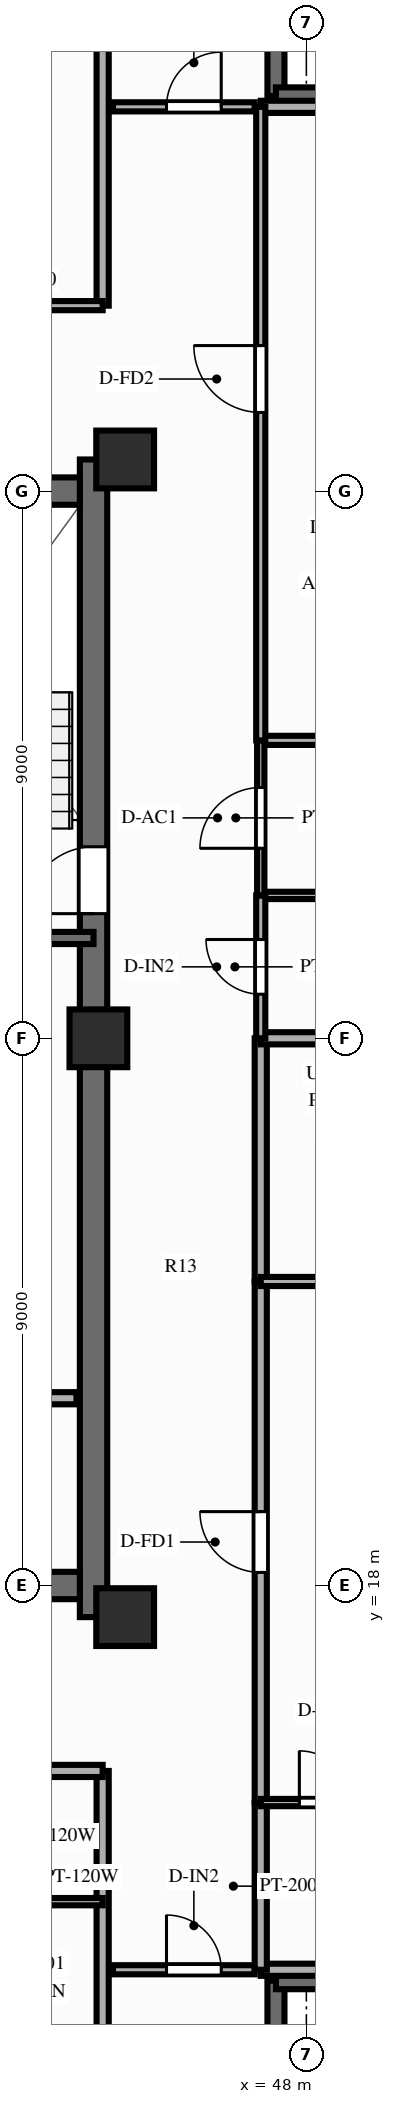
"""IFC4 building model, lengths in metres.
Left out: names, types, materials, properties, quantities, classifications, styles, units other than length and angle.
Written with IfcOpenShell. Run it as: python <this file> out.ifc"""

import sys

from ifc_helpers import new_model, si_unit, direction, frame, frame_2d, origin, origin_2d, place, context, subcontext, project, spatial, rectangle, extrude, source, transform, mapped, element, fill, save


model = new_model("IFC4")
c1 = context("Model", 3, precision=1e-05, world=origin(), true_north=direction((0.0, 1.0)))
c2 = subcontext(c1, "Body", "Model", "MODEL_VIEW")
j1 = project(units=[si_unit("LENGTHUNIT", "METRE"), si_unit("PLANEANGLEUNIT", "RADIAN")], contexts=[c1])
p1 = place(None, origin())
s1 = spatial("IfcSite", under=j1, at=p1, CompositionType="ELEMENT")
p2 = place(p1, origin())
s2 = spatial("IfcBuilding", under=s1, at=p2, CompositionType="ELEMENT")
p3 = place(p2, frame((0.0, 0.0, 243.0)))
s3 = spatial("IfcBuildingStorey", under=s2, at=p3, CompositionType="ELEMENT", Elevation=243.0)
p4 = place(p3, frame((44.5, 17.48, 0.0), z_axis=(0.0, 0.0, 1.0), x_axis=(0.0, 1.0, 0.0)))
e1 = element("IfcWall", 1, at=p4, inside=s3, PredefinedType="SHEAR", context=c2, shape_type="SweptSolid", body=[
    extrude(rectangle(XDim=19.04, YDim=0.45, at=frame_2d((9.52, 0.0))), origin(), (0.0, 0.0, 1.0), 3.0),
])
p5 = place(p4, frame((12.67, 0.0, 0.0), z_axis=(0.0, 0.0, 1.0), x_axis=(-1.0, 0.0, 0.0)))
e2 = element("IfcOpeningElement", 2, at=p5, cuts=e1, PredefinedType="OPENING", context=c2, shape_type="SweptSolid", body=[
    extrude(rectangle(XDim=1.1, YDim=2.15, at=frame_2d((0.55, 1.075))), frame((0.0, 0.237, 0.0), z_axis=(0.0, -1.0, 0.0), x_axis=(1.0, 0.0, 0.0)), (0.0, 0.0, 1.0), 0.474),
])
p6 = place(p3, frame((31.725, 18.0, 0.0), z_axis=(0.0, 0.0, 1.0), x_axis=(1.0, 0.0, 0.0)))
e3 = element("IfcWall", 3, at=p6, inside=s3, PredefinedType="SHEAR", context=c2, shape_type="SweptSolid", body=[
    extrude(rectangle(XDim=12.55, YDim=0.45, at=frame_2d((6.275, 0.0))), origin(), (0.0, 0.0, 1.0), 3.0),
])
p7 = place(p3, frame((31.725, 36.0, 0.0), z_axis=(0.0, 0.0, 1.0), x_axis=(1.0, 0.0, 0.0)))
e4 = element("IfcWall", 4, at=p7, inside=s3, PredefinedType="SHEAR", context=c2, shape_type="SweptSolid", body=[
    extrude(rectangle(XDim=12.55, YDim=0.45, at=frame_2d((6.275, 0.0))), origin(), (0.0, 0.0, 1.0), 3.0),
])
p8 = place(p7, frame((5.225, 0.0, 0.0), z_axis=(0.0, 0.0, 1.0), x_axis=(-1.0, 0.0, 0.0)))
e5 = element("IfcOpeningElement", 5, at=p8, cuts=e4, PredefinedType="OPENING", context=c2, shape_type="SweptSolid", body=[
    extrude(rectangle(XDim=1.4, YDim=2.15, at=frame_2d((0.7, 1.075))), frame((0.0, 0.237, 0.0), z_axis=(0.0, -1.0, 0.0), x_axis=(1.0, 0.0, 0.0)), (0.0, 0.0, 1.0), 0.474),
])
m1 = source(origin(), c2, "Body", "SweptSolid", [
    extrude(rectangle(XDim=0.95, YDim=0.95, at=origin_2d()), origin(), (0.0, 0.0, 1.0), 3.0),
])
for number, where, z_axis, x_axis in (
    (6, (45.02, 17.48, 0.0), (0.0, 0.0, 1.0), (1.0, 0.0, 0.0)),
    (7, (45.02, 36.52, 0.0), (0.0, 0.0, 1.0), (1.0, 0.0, 0.0)),
    (8, (44.58, 27.0, 0.0), (0.0, 0.0, 1.0), (1.0, 0.0, 0.0)),
):
    element("IfcColumn", number, at=place(p3, frame(where, z_axis=z_axis, x_axis=x_axis)), inside=s3, PredefinedType="COLUMN", context=c2, shape_type="MappedRepresentation", body=[
        mapped(m1, transform((0.0, 0.0, 0.0), scale=1.0)),
    ])
for number, where, z_axis, x_axis in (
    (9, (47.5, 6.08, 0.0), (0.0, 0.0, 1.0), (0.0, 1.0, 0.0)),
    (10, (47.5, 11.5, 0.0), (0.0, 0.0, 1.0), (1.0, 0.0, 0.0)),
    (11, (47.5, 42.5, 0.0), (0.0, 0.0, 1.0), (0.0, 1.0, 0.0)),
    (12, (47.5, 42.5, 0.0), (0.0, 0.0, 1.0), (1.0, 0.0, 0.0)),
):
    element("IfcWall", number, at=place(p3, frame(where, z_axis=z_axis, x_axis=x_axis)), inside=s3, PredefinedType="SOLIDWALL", context=c2, shape_type="SweptSolid", body=[
        extrude(rectangle(XDim=5.42, YDim=0.28, at=frame_2d((2.71, 0.0))), origin(), (0.0, 0.0, 1.0), 2.28),
    ])
p9 = place(p3, frame((42.88, 21.08, 0.0), z_axis=(0.0, 0.0, 1.0), x_axis=(1.0, 0.0, 0.0)))
e13 = element("IfcWall", 13, at=p9, inside=s3, PredefinedType="PARTITIONING", context=c2, shape_type="SweptSolid", body=[
    extrude(rectangle(XDim=1.34, YDim=0.2, at=frame_2d((0.67, 0.0))), origin(), (0.0, 0.0, 1.0), 2.79),
])
p10 = place(p3, frame((40.57, 28.65, 0.0), z_axis=(0.0, 0.0, 1.0), x_axis=(1.0, 0.0, 0.0)))
e14 = element("IfcWall", 14, at=p10, inside=s3, PredefinedType="SOLIDWALL", context=c2, shape_type="SweptSolid", body=[
    extrude(rectangle(XDim=3.93, YDim=0.2, at=frame_2d((1.965, 0.0))), origin(), (0.0, 0.0, 1.0), 2.79),
])
p11 = place(p3, frame((44.82, 11.68, 0.0), z_axis=(0.0, 0.0, 1.0), x_axis=(1.0, 0.0, 0.0)))
e15 = element("IfcWall", 15, at=p11, inside=s3, PredefinedType="PARTITIONING", context=c2, shape_type="SweptSolid", body=[
    extrude(rectangle(XDim=2.33, YDim=0.15, at=frame_2d((1.165, 0.0))), origin(), (0.0, 0.0, 1.0), 2.79),
])
p12 = place(p11, frame((0.88, 0.0, 0.0)))
e16 = element("IfcOpeningElement", 16, at=p12, cuts=e15, PredefinedType="OPENING", context=c2, shape_type="SweptSolid", body=[
    extrude(rectangle(XDim=0.9, YDim=2.1, at=frame_2d((0.45, 1.05))), frame((0.0, 0.087, 0.0), z_axis=(0.0, -1.0, 0.0), x_axis=(1.0, 0.0, 0.0)), (0.0, 0.0, 1.0), 0.174),
])
p13 = place(p3, frame((44.82, 42.32, 0.0), z_axis=(0.0, 0.0, 1.0), x_axis=(1.0, 0.0, 0.0)))
e17 = element("IfcWall", 17, at=p13, inside=s3, PredefinedType="PARTITIONING", context=c2, shape_type="SweptSolid", body=[
    extrude(rectangle(XDim=2.33, YDim=0.15, at=frame_2d((1.165, 0.0))), origin(), (0.0, 0.0, 1.0), 2.79),
])
p14 = place(p13, frame((0.88, 0.0, 0.0)))
e18 = element("IfcOpeningElement", 18, at=p14, cuts=e17, PredefinedType="OPENING", context=c2, shape_type="SweptSolid", body=[
    extrude(rectangle(XDim=0.9, YDim=2.1, at=frame_2d((0.45, 1.05))), frame((0.0, 0.087, 0.0), z_axis=(0.0, -1.0, 0.0), x_axis=(1.0, 0.0, 0.0)), (0.0, 0.0, 1.0), 0.174),
])
p15 = place(p3, frame((44.65, 14.95, 0.0), z_axis=(0.0, 0.0, 1.0), x_axis=(0.0, -1.0, 0.0)))
e19 = element("IfcWall", 19, at=p15, inside=s3, PredefinedType="PARTITIONING", context=c2, shape_type="SweptSolid", body=[
    extrude(rectangle(XDim=8.8, YDim=0.2, at=frame_2d((4.4, 0.0))), origin(), (0.0, 0.0, 1.0), 2.39),
])
p16 = place(p3, frame((41.8, 14.95, 0.0), z_axis=(0.0, 0.0, 1.0), x_axis=(1.0, 0.0, 0.0)))
e20 = element("IfcWall", 20, at=p16, inside=s3, PredefinedType="PARTITIONING", context=c2, shape_type="SweptSolid", body=[
    extrude(rectangle(XDim=2.85, YDim=0.2, at=frame_2d((1.425, 0.0))), origin(), (0.0, 0.0, 1.0), 2.79),
])
p17 = place(p3, frame((41.8, 12.8, 0.0), z_axis=(0.0, 0.0, 1.0), x_axis=(1.0, 0.0, 0.0)))
e21 = element("IfcWall", 21, at=p17, inside=s3, PredefinedType="PARTITIONING", context=c2, shape_type="SweptSolid", body=[
    extrude(rectangle(XDim=2.85, YDim=0.12, at=frame_2d((1.425, 0.0))), origin(), (0.0, 0.0, 1.0), 2.79),
])
p18 = place(p3, frame((44.65, 39.05, 0.0), z_axis=(0.0, 0.0, 1.0), x_axis=(0.0, 1.0, 0.0)))
e22 = element("IfcWall", 22, at=p18, inside=s3, PredefinedType="PARTITIONING", context=c2, shape_type="SweptSolid", body=[
    extrude(rectangle(XDim=8.8, YDim=0.2, at=frame_2d((4.4, 0.0))), origin(), (0.0, 0.0, 1.0), 2.39),
])
p19 = place(p3, frame((39.075, 39.05, 0.0), z_axis=(0.0, 0.0, 1.0), x_axis=(1.0, 0.0, 0.0)))
e23 = element("IfcWall", 23, at=p19, inside=s3, PredefinedType="PARTITIONING", context=c2, shape_type="SweptSolid", body=[
    extrude(rectangle(XDim=5.575, YDim=0.15, at=frame_2d((2.788, 0.0))), origin(), (0.0, 0.0, 1.0), 2.79),
])
p20 = place(p19, frame((2.238, 0.0, 0.0)))
e24 = element("IfcOpeningElement", 24, at=p20, cuts=e23, PredefinedType="OPENING", context=c2, shape_type="SweptSolid", body=[
    extrude(rectangle(XDim=1.1, YDim=2.15, at=frame_2d((0.55, 1.075))), frame((0.0, 0.087, 0.0), z_axis=(0.0, -1.0, 0.0), x_axis=(1.0, 0.0, 0.0)), (0.0, 0.0, 1.0), 0.174),
])
for number, where, z_axis, x_axis in (
    (25, (47.25, 11.68, 0.0), (0.0, 0.0, 1.0), (1.0, 0.0, 0.0)),
    (26, (47.25, 42.32, 0.0), (0.0, 0.0, 1.0), (1.0, 0.0, 0.0)),
):
    element("IfcWall", number, at=place(p3, frame(where, z_axis=z_axis, x_axis=x_axis)), inside=s3, PredefinedType="PARTITIONING", context=c2, shape_type="SweptSolid", body=[
        extrude(rectangle(XDim=5.6, YDim=0.2, at=frame_2d((2.8, 0.0))), origin(), (0.0, 0.0, 1.0), 2.79),
    ])
p21 = place(p3, frame((47.25, 11.68, 0.0), z_axis=(0.0, 0.0, 1.0), x_axis=(0.0, 1.0, 0.0)))
e27 = element("IfcWall", 27, at=p21, inside=s3, PredefinedType="PARTITIONING", context=c2, shape_type="SweptSolid", body=[
    extrude(rectangle(XDim=2.75, YDim=0.2, at=frame_2d((1.375, 0.0))), origin(), (0.0, 0.0, 1.0), 2.79),
])
p22 = place(p3, frame((47.25, 14.43, 0.0), z_axis=(0.0, 0.0, 1.0), x_axis=(0.0, 1.0, 0.0)))
e28 = element("IfcWall", 28, at=p22, inside=s3, PredefinedType="PARTITIONING", context=c2, shape_type="SweptSolid", body=[
    extrude(rectangle(XDim=8.57, YDim=0.2, at=frame_2d((4.285, 0.0))), origin(), (0.0, 0.0, 1.0), 2.79),
])
p23 = place(p22, frame((3.785, 0.0, 0.0)))
e29 = element("IfcOpeningElement", 29, at=p23, cuts=e28, PredefinedType="OPENING", context=c2, shape_type="SweptSolid", body=[
    extrude(rectangle(XDim=1.0, YDim=2.15, at=frame_2d((0.5, 1.075))), frame((0.0, 0.112, 0.0), z_axis=(0.0, -1.0, 0.0), x_axis=(1.0, 0.0, 0.0)), (0.0, 0.0, 1.0), 0.224),
])
p24 = place(p3, frame((47.25, 23.0, 0.0), z_axis=(0.0, 0.0, 1.0), x_axis=(0.0, 1.0, 0.0)))
e30 = element("IfcWall", 30, at=p24, inside=s3, PredefinedType="PARTITIONING", context=c2, shape_type="SweptSolid", body=[
    extrude(rectangle(XDim=4.0, YDim=0.2, at=frame_2d((2.0, 0.0))), origin(), (0.0, 0.0, 1.0), 2.79),
])
p25 = place(p3, frame((47.25, 14.43, 0.0), z_axis=(0.0, 0.0, 1.0), x_axis=(1.0, 0.0, 0.0)))
e31 = element("IfcWall", 31, at=p25, inside=s3, PredefinedType="PARTITIONING", context=c2, shape_type="SweptSolid", body=[
    extrude(rectangle(XDim=2.12, YDim=0.12, at=frame_2d((1.06, 0.0))), origin(), (0.0, 0.0, 1.0), 2.79),
])
p26 = place(p25, frame((0.635, 0.0, 0.0)))
e32 = element("IfcOpeningElement", 32, at=p26, cuts=e31, PredefinedType="OPENING", context=c2, shape_type="SweptSolid", body=[
    extrude(rectangle(XDim=0.85, YDim=2.05, at=frame_2d((0.425, 1.025))), frame((0.0, 0.072, 0.0), z_axis=(0.0, -1.0, 0.0), x_axis=(1.0, 0.0, 0.0)), (0.0, 0.0, 1.0), 0.144),
])
p27 = place(p3, frame((47.25, 23.0, 0.0), z_axis=(0.0, 0.0, 1.0), x_axis=(1.0, 0.0, 0.0)))
e33 = element("IfcWall", 33, at=p27, inside=s3, PredefinedType="PARTITIONING", context=c2, shape_type="SweptSolid", body=[
    extrude(rectangle(XDim=2.85, YDim=0.15, at=frame_2d((1.425, 0.0))), origin(), (0.0, 0.0, 1.0), 2.79),
])
p28 = place(p27, frame((0.975, 0.0, 0.0)))
e34 = element("IfcOpeningElement", 34, at=p28, cuts=e33, PredefinedType="OPENING", context=c2, shape_type="SweptSolid", body=[
    extrude(rectangle(XDim=0.9, YDim=2.1, at=frame_2d((0.45, 1.05))), frame((0.0, 0.087, 0.0), z_axis=(0.0, -1.0, 0.0), x_axis=(1.0, 0.0, 0.0)), (0.0, 0.0, 1.0), 0.174),
])
p29 = place(p3, frame((47.25, 27.0, 0.0), z_axis=(0.0, 0.0, 1.0), x_axis=(1.0, 0.0, 0.0)))
e35 = element("IfcWall", 35, at=p29, inside=s3, PredefinedType="PARTITIONING", context=c2, shape_type="SweptSolid", body=[
    extrude(rectangle(XDim=5.6, YDim=0.2, at=frame_2d((2.8, 0.0))), origin(), (0.0, 0.0, 1.0), 2.79),
])
p30 = place(p3, frame((47.25, 29.35, 0.0), z_axis=(0.0, 0.0, 1.0), x_axis=(1.0, 0.0, 0.0)))
e36 = element("IfcWall", 36, at=p30, inside=s3, PredefinedType="PARTITIONING", context=c2, shape_type="SweptSolid", body=[
    extrude(rectangle(XDim=3.6, YDim=0.12, at=frame_2d((1.8, 0.0))), origin(), (0.0, 0.0, 1.0), 2.79),
])
p31 = place(p3, frame((47.25, 31.9, 0.0), z_axis=(0.0, 0.0, 1.0), x_axis=(1.0, 0.0, 0.0)))
e37 = element("IfcWall", 37, at=p31, inside=s3, PredefinedType="PARTITIONING", context=c2, shape_type="SweptSolid", body=[
    extrude(rectangle(XDim=3.6, YDim=0.15, at=frame_2d((1.8, 0.0))), origin(), (0.0, 0.0, 1.0), 2.39),
])
p32 = place(p3, frame((47.25, 27.0, 0.0), z_axis=(0.0, 0.0, 1.0), x_axis=(0.0, 1.0, 0.0)))
e38 = element("IfcWall", 38, at=p32, inside=s3, PredefinedType="PARTITIONING", context=c2, shape_type="SweptSolid", body=[
    extrude(rectangle(XDim=2.35, YDim=0.15, at=frame_2d((1.175, 0.0))), origin(), (0.0, 0.0, 1.0), 2.79),
])
p33 = place(p32, frame((0.725, 0.0, 0.0)))
e39 = element("IfcOpeningElement", 39, at=p33, cuts=e38, PredefinedType="OPENING", context=c2, shape_type="SweptSolid", body=[
    extrude(rectangle(XDim=0.9, YDim=2.1, at=frame_2d((0.45, 1.05))), frame((0.0, 0.087, 0.0), z_axis=(0.0, -1.0, 0.0), x_axis=(1.0, 0.0, 0.0)), (0.0, 0.0, 1.0), 0.174),
])
p34 = place(p3, frame((47.25, 29.35, 0.0), z_axis=(0.0, 0.0, 1.0), x_axis=(0.0, 1.0, 0.0)))
e40 = element("IfcWall", 40, at=p34, inside=s3, PredefinedType="PARTITIONING", context=c2, shape_type="SweptSolid", body=[
    extrude(rectangle(XDim=2.55, YDim=0.12, at=frame_2d((1.275, 0.0))), origin(), (0.0, 0.0, 1.0), 2.79),
])
p35 = place(p34, frame((0.775, 0.0, 0.0)))
e41 = element("IfcOpeningElement", 41, at=p35, cuts=e40, PredefinedType="OPENING", context=c2, shape_type="SweptSolid", body=[
    extrude(rectangle(XDim=1.0, YDim=2.1, at=frame_2d((0.5, 1.05))), frame((0.0, 0.072, 0.0), z_axis=(0.0, -1.0, 0.0), x_axis=(1.0, 0.0, 0.0)), (0.0, 0.0, 1.0), 0.144),
])
p36 = place(p3, frame((47.25, 31.9, 0.0), z_axis=(0.0, 0.0, 1.0), x_axis=(0.0, 1.0, 0.0)))
e42 = element("IfcWall", 42, at=p36, inside=s3, PredefinedType="PARTITIONING", context=c2, shape_type="SweptSolid", body=[
    extrude(rectangle(XDim=10.42, YDim=0.15, at=frame_2d((5.21, 0.0))), origin(), (0.0, 0.0, 1.0), 2.79),
])
p37 = place(p36, frame((5.393, 0.0, 0.0)))
e43 = element("IfcOpeningElement", 43, at=p37, cuts=e42, PredefinedType="OPENING", context=c2, shape_type="SweptSolid", body=[
    extrude(rectangle(XDim=1.1, YDim=2.15, at=frame_2d((0.55, 1.075))), frame((0.0, 0.087, 0.0), z_axis=(0.0, -1.0, 0.0), x_axis=(1.0, 0.0, 0.0)), (0.0, 0.0, 1.0), 0.174),
])
m2 = source(origin(), c2, "Body", "SweptSolid", [
    extrude(rectangle(XDim=1.1, YDim=2.15, at=frame_2d((0.55, 1.075))), frame((0.0, 0.025, 0.0), z_axis=(0.0, -1.0, 0.0), x_axis=(1.0, 0.0, 0.0)), (0.0, 0.0, 1.0), 0.05),
])
p38 = place(p5, origin())
e44 = element("IfcDoor", 44, at=p38, inside=s3, OperationType="SINGLE_SWING_RIGHT", PredefinedType="DOOR", context=c2, shape_type="MappedRepresentation", body=[
    mapped(m2, transform((0.0, 0.0, 0.0), scale=1.0)),
])
fill(e2, e44)
m3 = source(origin(), c2, "Body", "SweptSolid", [
    extrude(rectangle(XDim=0.9, YDim=2.1, at=frame_2d((0.45, 1.05))), frame((0.0, 0.025, 0.0), z_axis=(0.0, -1.0, 0.0), x_axis=(1.0, 0.0, 0.0)), (0.0, 0.0, 1.0), 0.05),
])
p39 = place(p12, origin())
e45 = element("IfcDoor", 45, at=p39, inside=s3, OperationType="SINGLE_SWING_LEFT", PredefinedType="DOOR", context=c2, shape_type="MappedRepresentation", body=[
    mapped(m3, transform((0.0, 0.0, 0.0), scale=1.0)),
])
fill(e16, e45)
p40 = place(p14, origin())
e46 = element("IfcDoor", 46, at=p40, inside=s3, OperationType="SINGLE_SWING_RIGHT", PredefinedType="DOOR", context=c2, shape_type="MappedRepresentation", body=[
    mapped(m3, transform((0.0, 0.0, 0.0), scale=1.0)),
])
fill(e18, e46)
m4 = source(origin(), c2, "Body", "SweptSolid", [
    extrude(rectangle(XDim=1.0, YDim=2.15, at=frame_2d((0.5, 1.075))), frame((0.0, 0.025, 0.0), z_axis=(0.0, -1.0, 0.0), x_axis=(1.0, 0.0, 0.0)), (0.0, 0.0, 1.0), 0.05),
])
p41 = place(p23, origin())
e47 = element("IfcDoor", 47, at=p41, inside=s3, OperationType="SINGLE_SWING_RIGHT", PredefinedType="DOOR", context=c2, shape_type="MappedRepresentation", body=[
    mapped(m4, transform((0.0, 0.0, 0.0), scale=1.0)),
])
fill(e29, e47)
m5 = source(origin(), c2, "Body", "SweptSolid", [
    extrude(rectangle(XDim=0.85, YDim=2.05, at=frame_2d((0.425, 1.025))), frame((0.0, 0.025, 0.0), z_axis=(0.0, -1.0, 0.0), x_axis=(1.0, 0.0, 0.0)), (0.0, 0.0, 1.0), 0.05),
])
p42 = place(p26, origin())
e48 = element("IfcDoor", 48, at=p42, inside=s3, OperationType="SINGLE_SWING_LEFT", PredefinedType="DOOR", context=c2, shape_type="MappedRepresentation", body=[
    mapped(m5, transform((0.0, 0.0, 0.0), scale=1.0)),
])
fill(e32, e48)
p43 = place(p33, origin())
e49 = element("IfcDoor", 49, at=p43, inside=s3, OperationType="SINGLE_SWING_RIGHT", PredefinedType="DOOR", context=c2, shape_type="MappedRepresentation", body=[
    mapped(m3, transform((0.0, 0.0, 0.0), scale=1.0)),
])
fill(e39, e49)
m6 = source(origin(), c2, "Body", "SweptSolid", [
    extrude(rectangle(XDim=1.0, YDim=2.1, at=frame_2d((0.5, 1.05))), frame((0.0, 0.025, 0.0), z_axis=(0.0, -1.0, 0.0), x_axis=(1.0, 0.0, 0.0)), (0.0, 0.0, 1.0), 0.05),
])
p44 = place(p35, origin())
e50 = element("IfcDoor", 50, at=p44, inside=s3, OperationType="SINGLE_SWING_LEFT", PredefinedType="DOOR", context=c2, shape_type="MappedRepresentation", body=[
    mapped(m6, transform((0.0, 0.0, 0.0), scale=1.0)),
])
fill(e41, e50)
p45 = place(p37, origin())
e51 = element("IfcDoor", 51, at=p45, inside=s3, OperationType="SINGLE_SWING_RIGHT", PredefinedType="DOOR", context=c2, shape_type="MappedRepresentation", body=[
    mapped(m2, transform((0.0, 0.0, 0.0), scale=1.0)),
])
fill(e43, e51)
save(model, sys.argv[1])
